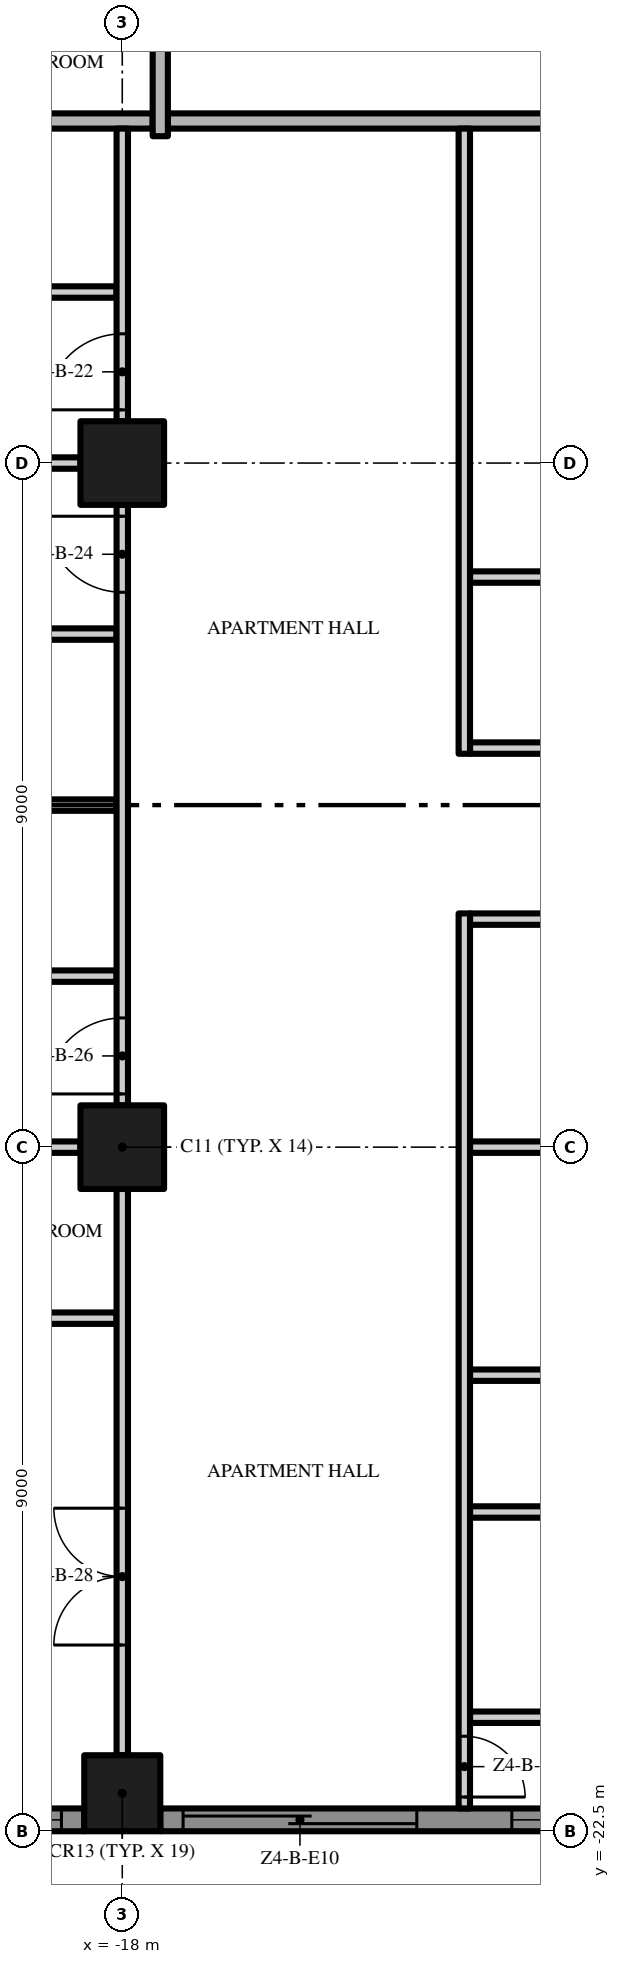
"""IFC4 building model, lengths in metres.
Left out: names, types, materials, properties, quantities, classifications, styles, units other than length and angle.
Written with IfcOpenShell. Run it as: python <this file> out.ifc"""

import sys

from ifc_helpers import new_model, si_unit, direction, frame, frame_2d, origin, origin_2d, place, context, subcontext, project, spatial, polyline, rectangle, outline, extrude, element, fill, save


model = new_model("IFC4")
c1 = context("Model", 3, precision=1e-05, world=origin(), true_north=direction((0.0, 1.0)))
c2 = subcontext(c1, "Body", "Model", "MODEL_VIEW")
j1 = project(units=[si_unit("LENGTHUNIT", "METRE"), si_unit("PLANEANGLEUNIT", "RADIAN")], contexts=[c1])
p1 = place(None, origin())
s1 = spatial("IfcSite", under=j1, at=p1, CompositionType="ELEMENT")
p2 = place(p1, origin())
s2 = spatial("IfcBuilding", under=s1, at=p2, CompositionType="ELEMENT")
p3 = place(p2, frame((0.0, 0.0, 203.4)))
s3 = spatial("IfcBuildingStorey", under=s2, at=p3, CompositionType="ELEMENT", Elevation=203.4)
p4 = place(p3, frame((-18.0, -13.5, 0.0), z_axis=(0.0, 0.0, 1.0), x_axis=(1.0, 0.0, 0.0)))
e1 = element("IfcColumn", 1, at=p4, inside=s3, PredefinedType="COLUMN", context=c2, shape_type="SweptSolid", body=[
    extrude(rectangle(XDim=1.1, YDim=1.1, at=origin_2d()), origin(), (0.0, 0.0, 1.0), 3.5),
])
p5 = place(p3, frame((-18.0, -22.0, 0.0), z_axis=(0.0, 0.0, 1.0), x_axis=(1.0, 0.0, 0.0)))
e2 = element("IfcColumn", 2, at=p5, inside=s3, PredefinedType="COLUMN", context=c2, shape_type="SweptSolid", body=[
    extrude(rectangle(XDim=1.0, YDim=1.0, at=origin_2d()), origin(), (0.0, 0.0, 1.0), 3.5),
])
p6 = place(p3, frame((-18.0, -4.5, 0.0), z_axis=(0.0, 0.0, 1.0), x_axis=(1.0, 0.0, 0.0)))
e3 = element("IfcColumn", 3, at=p6, inside=s3, PredefinedType="COLUMN", context=c2, shape_type="SweptSolid", body=[
    extrude(rectangle(XDim=1.1, YDim=1.1, at=origin_2d()), origin(), (0.0, 0.0, 1.0), 3.5),
])
p7 = place(p3, frame((-18.5, -22.35, 0.0), z_axis=(0.0, 0.0, 1.0), x_axis=(-1.0, 0.0, 0.0)))
e4 = element("IfcWall", 4, at=p7, inside=s3, PredefinedType="SOLIDWALL", context=c2, shape_type="SweptSolid", body=[
    extrude(rectangle(XDim=3.7, YDim=0.3, at=frame_2d((1.85, 0.0))), origin(), (0.0, 0.0, 1.0), 3.5),
])
p8 = place(p7, frame((0.3, 0.0, 0.45)))
e5 = element("IfcOpeningElement", 5, at=p8, cuts=e4, PredefinedType="OPENING", context=c2, shape_type="SweptSolid", body=[
    extrude(rectangle(XDim=3.075, YDim=2.65, at=frame_2d((1.538, 1.325))), frame((0.0, 0.16, 0.0), z_axis=(0.0, -1.0, 0.0), x_axis=(1.0, 0.0, 0.0)), (0.0, 0.0, 1.0), 0.32),
])
p9 = place(p3, frame((-9.5, -22.35, 0.0), z_axis=(0.0, 0.0, 1.0), x_axis=(-1.0, 0.0, 0.0)))
e6 = element("IfcWall", 6, at=p9, inside=s3, PredefinedType="SOLIDWALL", context=c2, shape_type="SweptSolid", body=[
    extrude(rectangle(XDim=8.0, YDim=0.3, at=frame_2d((4.0, 0.0))), origin(), (0.0, 0.0, 1.0), 3.5),
])
p10 = place(p9, frame((4.625, 0.0, 0.0)))
e7 = element("IfcOpeningElement", 7, at=p10, cuts=e6, PredefinedType="OPENING", context=c2, shape_type="SweptSolid", body=[
    extrude(rectangle(XDim=3.075, YDim=2.4, at=frame_2d((1.538, 1.2))), frame((0.0, 0.16, 0.0), z_axis=(0.0, -1.0, 0.0), x_axis=(1.0, 0.0, 0.0)), (0.0, 0.0, 1.0), 0.32),
])
p11 = place(p9, frame((0.3, 0.0, 0.45)))
e8 = element("IfcOpeningElement", 8, at=p11, cuts=e6, PredefinedType="OPENING", context=c2, shape_type="SweptSolid", body=[
    extrude(rectangle(XDim=3.075, YDim=2.65, at=frame_2d((1.538, 1.325))), frame((0.0, 0.16, 0.0), z_axis=(0.0, -1.0, 0.0), x_axis=(1.0, 0.0, 0.0)), (0.0, 0.0, 1.0), 0.32),
])
p12 = place(p3, origin())
e9 = element("IfcWall", 9, at=p12, inside=s3, PredefinedType="USERDEFINED", context=c2, shape_type="SweptSolid", body=[
    extrude(outline(polyline([(-22.5, -23.1), (-21.0, -23.329), (-19.5, -23.929), (-18.0, -24.671), (-16.5, -25.271), (-15.0, -25.5), (-13.5, -25.271), (-12.0, -24.671), (-10.5, -23.929), (-9.0, -23.329), (-7.5, -23.1), (-6.0, -23.329), (-4.5, -23.929), (-3.0, -24.671), (-1.5, -25.271), (0.0, -25.5), (1.5, -25.271), (3.0, -24.671), (4.5, -23.929), (6.0, -23.329), (7.5, -23.1), (9.0, -23.329), (10.5, -23.929), (12.0, -24.671), (13.5, -25.271), (15.0, -25.5), (16.5, -25.271), (18.0, -24.671), (19.5, -23.929), (21.0, -23.329), (22.5, -23.1), (22.462, -22.853), (20.934, -23.086), (19.398, -23.701), (17.898, -24.442), (16.434, -25.028), (15.0, -25.247), (13.566, -25.028), (12.102, -24.442), (10.602, -23.701), (9.066, -23.086), (7.5, -22.847), (5.934, -23.086), (4.398, -23.701), (2.898, -24.442), (1.434, -25.028), (0.0, -25.247), (-1.434, -25.028), (-2.898, -24.442), (-4.398, -23.701), (-5.934, -23.086), (-7.5, -22.847), (-9.066, -23.086), (-10.602, -23.701), (-12.102, -24.442), (-13.566, -25.028), (-15.0, -25.247), (-16.434, -25.028), (-17.898, -24.442), (-19.398, -23.701), (-20.934, -23.086), (-22.462, -22.853), (-22.5, -23.1)])), origin(), (0.0, 0.0, 1.0), 0.9),
])
for number, where, z_axis, x_axis in (
    (10, (-13.425, -21.0, 0.0), (0.0, 0.0, 1.0), (1.0, 0.0, 0.0)),
    (11, (-13.425, -18.3, 0.0), (0.0, 0.0, 1.0), (1.0, 0.0, 0.0)),
    (12, (-13.425, -16.5, 0.0), (0.0, 0.0, 1.0), (1.0, 0.0, 0.0)),
):
    element("IfcWall", number, at=place(p3, frame(where, z_axis=z_axis, x_axis=x_axis)), inside=s3, PredefinedType="PARTITIONING", context=c2, shape_type="SweptSolid", body=[
        extrude(rectangle(XDim=4.35, YDim=0.15, at=frame_2d((2.175, 0.0))), origin(), (0.0, 0.0, 1.0), 3.5),
    ])
p13 = place(p3, frame((-20.925, -15.75, 0.0), z_axis=(0.0, 0.0, 1.0), x_axis=(1.0, 0.0, 0.0)))
e13 = element("IfcWall", 13, at=p13, inside=s3, PredefinedType="PARTITIONING", context=c2, shape_type="SweptSolid", body=[
    extrude(rectangle(XDim=2.85, YDim=0.15, at=frame_2d((1.425, 0.0))), origin(), (0.0, 0.0, 1.0), 3.5),
])
p14 = place(p3, frame((-26.0, -13.5, 0.0), z_axis=(0.0, 0.0, 1.0), x_axis=(1.0, 0.0, 0.0)))
e14 = element("IfcWall", 14, at=p14, inside=s3, PredefinedType="PARTITIONING", context=c2, shape_type="SweptSolid", body=[
    extrude(rectangle(XDim=7.45, YDim=0.15, at=frame_2d((3.725, 0.0))), origin(), (0.0, 0.0, 1.0), 3.5),
])
p15 = place(p3, frame((-13.425, -13.5, 0.0), z_axis=(0.0, 0.0, 1.0), x_axis=(1.0, 0.0, 0.0)))
e15 = element("IfcWall", 15, at=p15, inside=s3, PredefinedType="PARTITIONING", context=c2, shape_type="SweptSolid", body=[
    extrude(rectangle(XDim=3.875, YDim=0.15, at=frame_2d((1.938, 0.0))), origin(), (0.0, 0.0, 1.0), 3.5),
])
p16 = place(p3, frame((-20.925, -11.25, 0.0), z_axis=(0.0, 0.0, 1.0), x_axis=(1.0, 0.0, 0.0)))
e16 = element("IfcWall", 16, at=p16, inside=s3, PredefinedType="PARTITIONING", context=c2, shape_type="SweptSolid", body=[
    extrude(rectangle(XDim=2.85, YDim=0.15, at=frame_2d((1.425, 0.0))), origin(), (0.0, 0.0, 1.0), 3.5),
])
p17 = place(p3, frame((-13.425, -10.5, 0.0), z_axis=(0.0, 0.0, 1.0), x_axis=(1.0, 0.0, 0.0)))
e17 = element("IfcWall", 17, at=p17, inside=s3, PredefinedType="PARTITIONING", context=c2, shape_type="SweptSolid", body=[
    extrude(rectangle(XDim=4.35, YDim=0.15, at=frame_2d((2.175, 0.0))), origin(), (0.0, 0.0, 1.0), 3.5),
])
p18 = place(p3, frame((-20.925, -9.0, 0.0), z_axis=(0.0, 0.0, 1.0), x_axis=(1.0, 0.0, 0.0)))
e18 = element("IfcWall", 18, at=p18, inside=s3, PredefinedType="PARTITIONING", context=c2, shape_type="SweptSolid", body=[
    extrude(rectangle(XDim=2.85, YDim=0.15, at=frame_2d((1.425, 0.0))), origin(), (0.0, 0.0, 1.0), 3.5),
])
p19 = place(p3, frame((-13.425, -8.25, 0.0), z_axis=(0.0, 0.0, 1.0), x_axis=(1.0, 0.0, 0.0)))
e19 = element("IfcWall", 19, at=p19, inside=s3, PredefinedType="PARTITIONING", context=c2, shape_type="SweptSolid", body=[
    extrude(rectangle(XDim=4.35, YDim=0.15, at=frame_2d((2.175, 0.0))), origin(), (0.0, 0.0, 1.0), 3.5),
])
p20 = place(p19, frame((1.75, 0.0, 0.0)))
e20 = element("IfcOpeningElement", 20, at=p20, cuts=e19, PredefinedType="OPENING", context=c2, shape_type="SweptSolid", body=[
    extrude(rectangle(XDim=0.9, YDim=2.1, at=frame_2d((0.45, 1.05))), frame((0.0, 0.085, 0.0), z_axis=(0.0, -1.0, 0.0), x_axis=(1.0, 0.0, 0.0)), (0.0, 0.0, 1.0), 0.17),
])
p21 = place(p3, frame((-20.925, -6.75, 0.0), z_axis=(0.0, 0.0, 1.0), x_axis=(1.0, 0.0, 0.0)))
e21 = element("IfcWall", 21, at=p21, inside=s3, PredefinedType="PARTITIONING", context=c2, shape_type="SweptSolid", body=[
    extrude(rectangle(XDim=2.85, YDim=0.15, at=frame_2d((1.425, 0.0))), origin(), (0.0, 0.0, 1.0), 3.5),
])
p22 = place(p3, frame((-13.425, -6.0, 0.0), z_axis=(0.0, 0.0, 1.0), x_axis=(1.0, 0.0, 0.0)))
e22 = element("IfcWall", 22, at=p22, inside=s3, PredefinedType="PARTITIONING", context=c2, shape_type="SweptSolid", body=[
    extrude(rectangle(XDim=4.35, YDim=0.15, at=frame_2d((2.175, 0.0))), origin(), (0.0, 0.0, 1.0), 3.5),
])
p23 = place(p3, frame((-26.0, -4.5, 0.0), z_axis=(0.0, 0.0, 1.0), x_axis=(1.0, 0.0, 0.0)))
e23 = element("IfcWall", 23, at=p23, inside=s3, PredefinedType="PARTITIONING", context=c2, shape_type="SweptSolid", body=[
    extrude(rectangle(XDim=7.45, YDim=0.15, at=frame_2d((3.725, 0.0))), origin(), (0.0, 0.0, 1.0), 3.5),
])
p24 = place(p3, frame((-20.925, -2.25, 0.0), z_axis=(0.0, 0.0, 1.0), x_axis=(1.0, 0.0, 0.0)))
e24 = element("IfcWall", 24, at=p24, inside=s3, PredefinedType="PARTITIONING", context=c2, shape_type="SweptSolid", body=[
    extrude(rectangle(XDim=2.85, YDim=0.15, at=frame_2d((1.425, 0.0))), origin(), (0.0, 0.0, 1.0), 3.5),
])
p25 = place(p3, frame((-17.4, 0.0, 0.0), z_axis=(0.0, 0.0, 1.0), x_axis=(1.0, 0.0, 0.0)))
e25 = element("IfcWall", 25, at=p25, inside=s3, PredefinedType="PARTITIONING", context=c2, shape_type="SweptSolid", body=[
    extrude(rectangle(XDim=12.8, YDim=0.2, at=frame_2d((6.4, 0.0))), origin(), (0.0, 0.0, 1.0), 3.5),
])
p26 = place(p3, frame((-26.7, 0.0, 0.0), z_axis=(0.0, 0.0, 1.0), x_axis=(1.0, 0.0, 0.0)))
e26 = element("IfcWall", 26, at=p26, inside=s3, PredefinedType="PARTITIONING", context=c2, shape_type="SweptSolid", body=[
    extrude(rectangle(XDim=9.1, YDim=0.2, at=frame_2d((4.55, 0.0))), origin(), (0.0, 0.0, 1.0), 3.5),
])
p27 = place(p3, frame((-18.0, -21.5, 0.0), z_axis=(0.0, 0.0, 1.0), x_axis=(0.0, 1.0, 0.0)))
e27 = element("IfcWall", 27, at=p27, inside=s3, PredefinedType="PARTITIONING", context=c2, shape_type="SweptSolid", body=[
    extrude(rectangle(XDim=7.45, YDim=0.15, at=frame_2d((3.725, 0.0))), origin(), (0.0, 0.0, 1.0), 3.5),
])
p28 = place(p27, frame((1.45, 0.0, 0.0)))
e28 = element("IfcOpeningElement", 28, at=p28, cuts=e27, PredefinedType="OPENING", context=c2, shape_type="SweptSolid", body=[
    extrude(rectangle(XDim=1.8, YDim=2.4, at=frame_2d((0.9, 1.2))), frame((0.0, 0.085, 0.0), z_axis=(0.0, -1.0, 0.0), x_axis=(1.0, 0.0, 0.0)), (0.0, 0.0, 1.0), 0.17),
])
p29 = place(p3, frame((-18.0, -12.95, 0.0), z_axis=(0.0, 0.0, 1.0), x_axis=(0.0, 1.0, 0.0)))
e29 = element("IfcWall", 29, at=p29, inside=s3, PredefinedType="PARTITIONING", context=c2, shape_type="SweptSolid", body=[
    extrude(rectangle(XDim=7.9, YDim=0.15, at=frame_2d((3.95, 0.0))), origin(), (0.0, 0.0, 1.0), 3.5),
])
p30 = place(p29, frame((6.75, 0.0, 0.0)))
e30 = element("IfcOpeningElement", 30, at=p30, cuts=e29, PredefinedType="OPENING", context=c2, shape_type="SweptSolid", body=[
    extrude(rectangle(XDim=1.0, YDim=2.4, at=frame_2d((0.5, 1.2))), frame((0.0, 0.085, 0.0), z_axis=(0.0, -1.0, 0.0), x_axis=(1.0, 0.0, 0.0)), (0.0, 0.0, 1.0), 0.17),
])
p31 = place(p29, frame((0.15, 0.0, 0.0)))
e31 = element("IfcOpeningElement", 31, at=p31, cuts=e29, PredefinedType="OPENING", context=c2, shape_type="SweptSolid", body=[
    extrude(rectangle(XDim=1.0, YDim=2.4, at=frame_2d((0.5, 1.2))), frame((0.0, 0.085, 0.0), z_axis=(0.0, -1.0, 0.0), x_axis=(1.0, 0.0, 0.0)), (0.0, 0.0, 1.0), 0.17),
])
p32 = place(p3, frame((-18.0, -3.95, 0.0), z_axis=(0.0, 0.0, 1.0), x_axis=(0.0, 1.0, 0.0)))
e32 = element("IfcWall", 32, at=p32, inside=s3, PredefinedType="PARTITIONING", context=c2, shape_type="SweptSolid", body=[
    extrude(rectangle(XDim=3.85, YDim=0.15, at=frame_2d((1.925, 0.0))), origin(), (0.0, 0.0, 1.0), 3.5),
])
p33 = place(p32, frame((0.15, 0.0, 0.0)))
e33 = element("IfcOpeningElement", 33, at=p33, cuts=e32, PredefinedType="OPENING", context=c2, shape_type="SweptSolid", body=[
    extrude(rectangle(XDim=1.0, YDim=2.4, at=frame_2d((0.5, 1.2))), frame((0.0, 0.085, 0.0), z_axis=(0.0, -1.0, 0.0), x_axis=(1.0, 0.0, 0.0)), (0.0, 0.0, 1.0), 0.17),
])
p34 = place(p3, frame((-17.5, -0.2, 0.0), z_axis=(0.0, 0.0, 1.0), x_axis=(0.0, 1.0, 0.0)))
e34 = element("IfcWall", 34, at=p34, inside=s3, PredefinedType="PARTITIONING", context=c2, shape_type="SweptSolid", body=[
    extrude(rectangle(XDim=4.15, YDim=0.2, at=frame_2d((2.075, 0.0))), origin(), (0.0, 0.0, 1.0), 3.5),
])
p35 = place(p3, frame((-13.5, -10.425, 0.0), z_axis=(0.0, 0.0, 1.0), x_axis=(0.0, -1.0, 0.0)))
e35 = element("IfcWall", 35, at=p35, inside=s3, PredefinedType="PARTITIONING", context=c2, shape_type="SweptSolid", body=[
    extrude(rectangle(XDim=11.775, YDim=0.15, at=frame_2d((5.888, 0.0))), origin(), (0.0, 0.0, 1.0), 3.5),
])
p36 = place(p35, frame((10.825, 0.0, 0.0)))
e36 = element("IfcOpeningElement", 36, at=p36, cuts=e35, PredefinedType="OPENING", context=c2, shape_type="SweptSolid", body=[
    extrude(rectangle(XDim=0.8, YDim=2.0, at=frame_2d((0.4, 1.0))), frame((0.0, 0.085, 0.0), z_axis=(0.0, -1.0, 0.0), x_axis=(1.0, 0.0, 0.0)), (0.0, 0.0, 1.0), 0.17),
])
p37 = place(p3, frame((-13.5, -8.325, 0.0), z_axis=(0.0, 0.0, 1.0), x_axis=(0.0, 1.0, 0.0)))
e37 = element("IfcWall", 37, at=p37, inside=s3, PredefinedType="PARTITIONING", context=c2, shape_type="SweptSolid", body=[
    extrude(rectangle(XDim=8.225, YDim=0.15, at=frame_2d((4.112, 0.0))), origin(), (0.0, 0.0, 1.0), 3.5),
])
p38 = place(p8, origin())
e38 = element("IfcWindow", 38, at=p38, inside=s3, PartitioningType="SINGLE_PANEL", PredefinedType="WINDOW", context=c2, shape_type="SweptSolid", body=[
    extrude(rectangle(XDim=3.075, YDim=2.65, at=frame_2d((1.538, 1.325))), frame((0.0, 0.03, 0.0), z_axis=(0.0, -1.0, 0.0), x_axis=(1.0, 0.0, 0.0)), (0.0, 0.0, 1.0), 0.06),
])
fill(e5, e38)
p39 = place(p10, origin())
e39 = element("IfcDoor", 39, at=p39, inside=s3, OperationType="SINGLE_SWING_LEFT", PredefinedType="DOOR", context=c2, shape_type="SweptSolid", body=[
    extrude(rectangle(XDim=3.075, YDim=2.4, at=frame_2d((1.538, 1.2))), frame((0.0, 0.025, 0.0), z_axis=(0.0, -1.0, 0.0), x_axis=(1.0, 0.0, 0.0)), (0.0, 0.0, 1.0), 0.05),
])
fill(e7, e39)
p40 = place(p11, origin())
e40 = element("IfcWindow", 40, at=p40, inside=s3, PartitioningType="SINGLE_PANEL", PredefinedType="WINDOW", context=c2, shape_type="SweptSolid", body=[
    extrude(rectangle(XDim=3.075, YDim=2.65, at=frame_2d((1.538, 1.325))), frame((0.0, 0.03, 0.0), z_axis=(0.0, -1.0, 0.0), x_axis=(1.0, 0.0, 0.0)), (0.0, 0.0, 1.0), 0.06),
])
fill(e8, e40)
p41 = place(p36, origin())
e41 = element("IfcDoor", 41, at=p41, inside=s3, OperationType="SINGLE_SWING_RIGHT", PredefinedType="DOOR", context=c2, shape_type="SweptSolid", body=[
    extrude(rectangle(XDim=0.8, YDim=2.0, at=frame_2d((0.4, 1.0))), frame((0.0, 0.025, 0.0), z_axis=(0.0, -1.0, 0.0), x_axis=(1.0, 0.0, 0.0)), (0.0, 0.0, 1.0), 0.05),
])
fill(e36, e41)
p42 = place(p33, origin())
e42 = element("IfcDoor", 42, at=p42, inside=s3, OperationType="SINGLE_SWING_LEFT", PredefinedType="DOOR", context=c2, shape_type="SweptSolid", body=[
    extrude(rectangle(XDim=1.0, YDim=2.4, at=frame_2d((0.5, 1.2))), frame((0.0, 0.025, 0.0), z_axis=(0.0, -1.0, 0.0), x_axis=(1.0, 0.0, 0.0)), (0.0, 0.0, 1.0), 0.05),
])
fill(e33, e42)
p43 = place(p30, origin())
e43 = element("IfcDoor", 43, at=p43, inside=s3, OperationType="SINGLE_SWING_RIGHT", PredefinedType="DOOR", context=c2, shape_type="SweptSolid", body=[
    extrude(rectangle(XDim=1.0, YDim=2.4, at=frame_2d((0.5, 1.2))), frame((0.0, 0.025, 0.0), z_axis=(0.0, -1.0, 0.0), x_axis=(1.0, 0.0, 0.0)), (0.0, 0.0, 1.0), 0.05),
])
fill(e30, e43)
p44 = place(p31, origin())
e44 = element("IfcDoor", 44, at=p44, inside=s3, OperationType="SINGLE_SWING_LEFT", PredefinedType="DOOR", context=c2, shape_type="SweptSolid", body=[
    extrude(rectangle(XDim=1.0, YDim=2.4, at=frame_2d((0.5, 1.2))), frame((0.0, 0.025, 0.0), z_axis=(0.0, -1.0, 0.0), x_axis=(1.0, 0.0, 0.0)), (0.0, 0.0, 1.0), 0.05),
])
fill(e31, e44)
p45 = place(p28, origin())
e45 = element("IfcDoor", 45, at=p45, inside=s3, OperationType="DOUBLE_DOOR_SINGLE_SWING", PredefinedType="DOOR", context=c2, shape_type="SweptSolid", body=[
    extrude(rectangle(XDim=1.8, YDim=2.4, at=frame_2d((0.9, 1.2))), frame((0.0, 0.025, 0.0), z_axis=(0.0, -1.0, 0.0), x_axis=(1.0, 0.0, 0.0)), (0.0, 0.0, 1.0), 0.05),
])
fill(e28, e45)
save(model, sys.argv[1])
